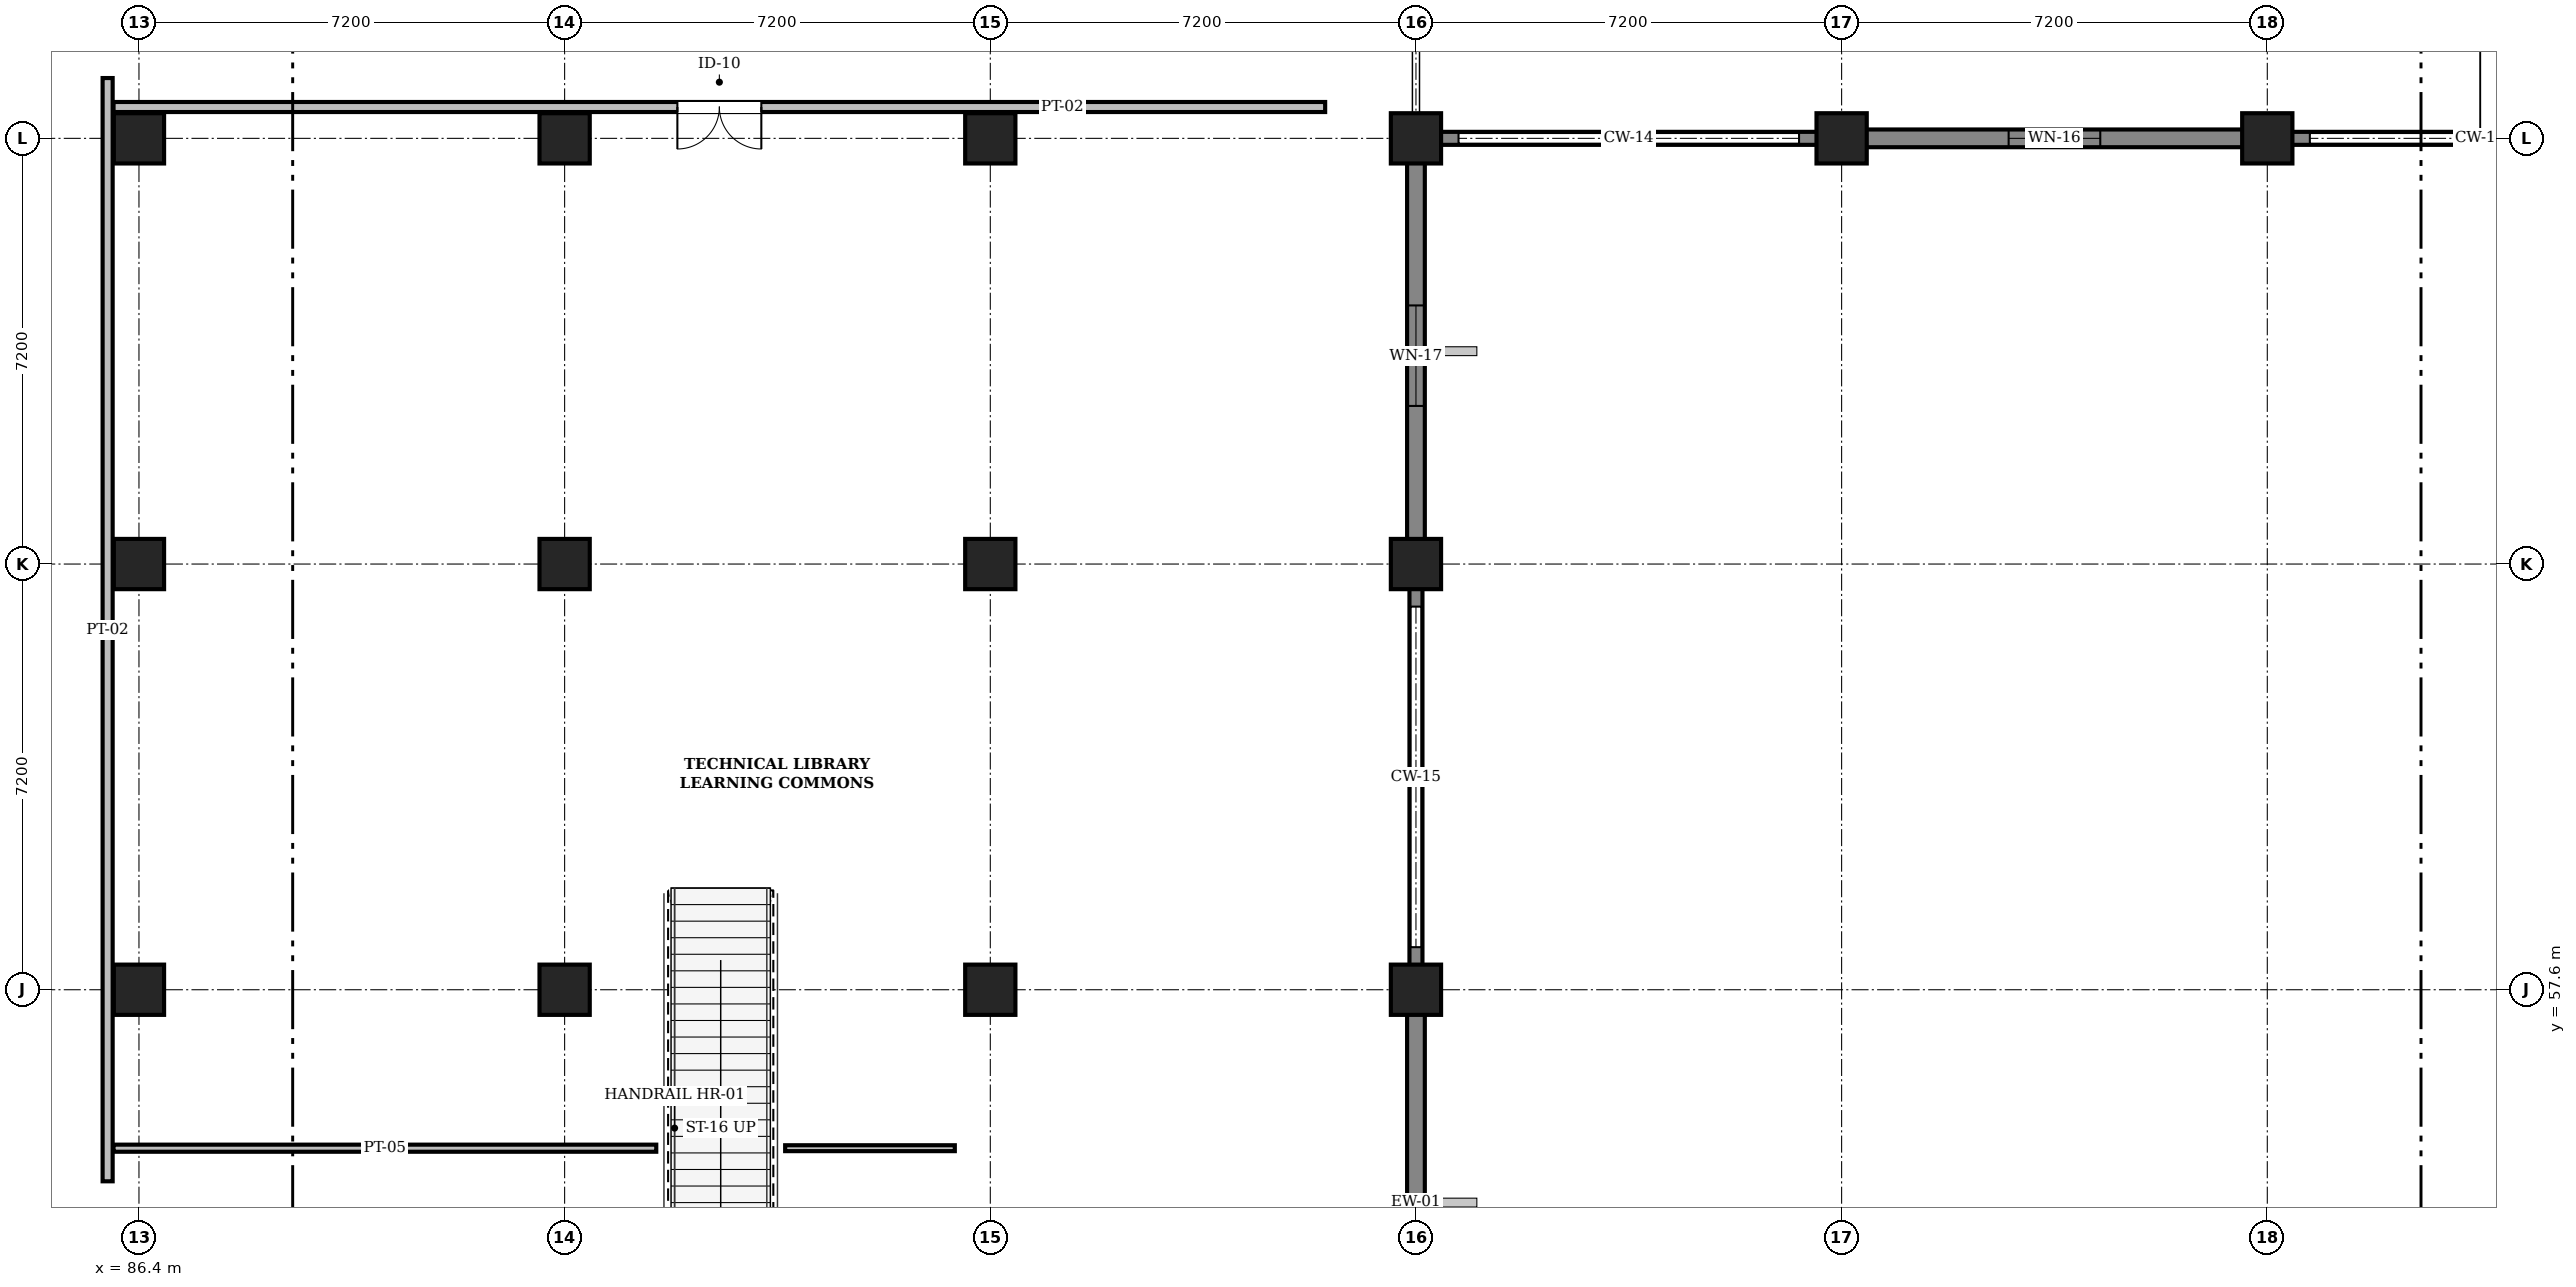
"""IFC4 building model, lengths in metres.
Left out: names, types, materials, properties, quantities, classifications, styles, units other than length and angle.
Written with IfcOpenShell. Run it as: python <this file> out.ifc"""

import sys

from ifc_helpers import new_model, si_unit, direction, frame, frame_2d, origin, origin_2d, place, context, subcontext, project, spatial, rectangle, extrude, element, fill, save


model = new_model("IFC4")
c1 = context("Model", 3, precision=1e-05, world=origin(), true_north=direction((0.0, 1.0)))
c2 = subcontext(c1, "Body", "Model", "MODEL_VIEW")
j1 = project(units=[si_unit("LENGTHUNIT", "METRE"), si_unit("PLANEANGLEUNIT", "RADIAN")], contexts=[c1])
p1 = place(None, origin())
s1 = spatial("IfcSite", under=j1, at=p1, CompositionType="ELEMENT")
p2 = place(p1, origin())
s2 = spatial("IfcBuilding", under=s1, at=p2, CompositionType="ELEMENT")
p3 = place(p2, frame((0.0, 0.0, 4.8)))
s3 = spatial("IfcBuildingStorey", under=s2, at=p3, CompositionType="ELEMENT", Elevation=4.8)
for number, where, z_axis, x_axis in (
    (1, (86.4, 57.6, 0.0), (0.0, 0.0, 1.0), (1.0, 0.0, 0.0)),
    (2, (86.4, 64.8, 0.0), (0.0, 0.0, 1.0), (1.0, 0.0, 0.0)),
    (3, (86.4, 72.0, 0.0), (0.0, 0.0, 1.0), (1.0, 0.0, 0.0)),
    (4, (93.6, 57.6, 0.0), (0.0, 0.0, 1.0), (1.0, 0.0, 0.0)),
    (5, (93.6, 64.8, 0.0), (0.0, 0.0, 1.0), (1.0, 0.0, 0.0)),
    (6, (93.6, 72.0, 0.0), (0.0, 0.0, 1.0), (1.0, 0.0, 0.0)),
    (7, (100.8, 57.6, 0.0), (0.0, 0.0, 1.0), (1.0, 0.0, 0.0)),
    (8, (100.8, 64.8, 0.0), (0.0, 0.0, 1.0), (1.0, 0.0, 0.0)),
    (9, (100.8, 72.0, 0.0), (0.0, 0.0, 1.0), (1.0, 0.0, 0.0)),
    (10, (108.0, 57.6, 0.0), (0.0, 0.0, 1.0), (1.0, 0.0, 0.0)),
    (11, (108.0, 64.8, 0.0), (0.0, 0.0, 1.0), (1.0, 0.0, 0.0)),
    (12, (108.0, 72.0, 0.0), (0.0, 0.0, 1.0), (1.0, 0.0, 0.0)),
    (13, (115.2, 72.0, 0.0), (0.0, 0.0, 1.0), (1.0, 0.0, 0.0)),
    (14, (122.4, 72.0, 0.0), (0.0, 0.0, 1.0), (1.0, 0.0, 0.0)),
):
    element("IfcColumn", number, at=place(p3, frame(where, z_axis=z_axis, x_axis=x_axis)), inside=s3, PredefinedType="COLUMN", context=c2, shape_type="SweptSolid", body=[
        extrude(rectangle(XDim=0.85, YDim=0.85, at=origin_2d()), origin(), (0.0, 0.0, 1.0), 4.8),
    ])
p4 = place(p3, frame((129.6, 72.0, 0.0), z_axis=(0.0, 0.0, 1.0), x_axis=(-1.0, 0.0, 0.0)))
e15 = element("IfcWall", 15, at=p4, inside=s3, PredefinedType="SOLIDWALL", context=c2, shape_type="SweptSolid", body=[
    extrude(rectangle(XDim=7.2, YDim=0.22, at=frame_2d((3.6, 0.0))), origin(), (0.0, 0.0, 1.0), 1.24),
])
p5 = place(p3, frame((122.4, 72.0, 0.0), z_axis=(0.0, 0.0, 1.0), x_axis=(-1.0, 0.0, 0.0)))
e16 = element("IfcWall", 16, at=p5, inside=s3, PredefinedType="SOLIDWALL", context=c2, shape_type="SweptSolid", body=[
    extrude(rectangle(XDim=7.2, YDim=0.3, at=frame_2d((3.6, 0.0))), origin(), (0.0, 0.0, 1.0), 4.52),
])
p6 = place(p5, frame((2.825, 0.0, 0.95)))
e17 = element("IfcOpeningElement", 17, at=p6, cuts=e16, PredefinedType="OPENING", context=c2, shape_type="SweptSolid", body=[
    extrude(rectangle(XDim=1.55, YDim=1.55, at=frame_2d((0.775, 0.775))), frame((0.0, 0.162, 0.0), z_axis=(0.0, -1.0, 0.0), x_axis=(1.0, 0.0, 0.0)), (0.0, 0.0, 1.0), 0.324),
])
p7 = place(p3, frame((115.2, 72.0, 0.0), z_axis=(0.0, 0.0, 1.0), x_axis=(-1.0, 0.0, 0.0)))
e18 = element("IfcWall", 18, at=p7, inside=s3, PredefinedType="SOLIDWALL", context=c2, shape_type="SweptSolid", body=[
    extrude(rectangle(XDim=7.35, YDim=0.22, at=frame_2d((3.675, 0.0))), origin(), (0.0, 0.0, 1.0), 1.24),
])
p8 = place(p3, frame((108.0, 71.848, 0.0), z_axis=(0.0, 0.0, 1.0), x_axis=(0.0, -1.0, 0.0)))
e19 = element("IfcWall", 19, at=p8, inside=s3, PredefinedType="SOLIDWALL", context=c2, shape_type="SweptSolid", body=[
    extrude(rectangle(XDim=7.048, YDim=0.3, at=frame_2d((3.524, 0.0))), origin(), (0.0, 0.0, 1.0), 4.52),
])
p9 = place(p8, frame((2.674, 0.0, 0.95)))
e20 = element("IfcOpeningElement", 20, at=p9, cuts=e19, PredefinedType="OPENING", context=c2, shape_type="SweptSolid", body=[
    extrude(rectangle(XDim=1.7, YDim=1.55, at=frame_2d((0.85, 0.775))), frame((0.0, 0.162, 0.0), z_axis=(0.0, -1.0, 0.0), x_axis=(1.0, 0.0, 0.0)), (0.0, 0.0, 1.0), 0.324),
])
p10 = place(p3, frame((108.0, 64.8, 0.0), z_axis=(0.0, 0.0, 1.0), x_axis=(0.0, -1.0, 0.0)))
e21 = element("IfcWall", 21, at=p10, inside=s3, PredefinedType="SOLIDWALL", context=c2, shape_type="SweptSolid", body=[
    extrude(rectangle(XDim=7.2, YDim=0.22, at=frame_2d((3.6, 0.0))), origin(), (0.0, 0.0, 1.0), 1.24),
])
p11 = place(p3, frame((108.0, 57.6, 0.0), z_axis=(0.0, 0.0, 1.0), x_axis=(0.0, -1.0, 0.0)))
e22 = element("IfcWall", 22, at=p11, inside=s3, PredefinedType="SOLIDWALL", context=c2, shape_type="SweptSolid", body=[
    extrude(rectangle(XDim=7.2, YDim=0.3, at=frame_2d((3.6, 0.0))), origin(), (0.0, 0.0, 1.0), 4.52),
])
p12 = place(p11, frame((4.005, 0.0, 0.95)))
e23 = element("IfcOpeningElement", 23, at=p12, cuts=e22, PredefinedType="OPENING", context=c2, shape_type="SweptSolid", body=[
    extrude(rectangle(XDim=1.85, YDim=1.55, at=frame_2d((0.925, 0.775))), frame((0.0, 0.162, 0.0), z_axis=(0.0, -1.0, 0.0), x_axis=(1.0, 0.0, 0.0)), (0.0, 0.0, 1.0), 0.324),
])
p13 = place(p3, frame((85.87, 54.36, 0.0), z_axis=(0.0, 0.0, 1.0), x_axis=(0.0, 1.0, 0.0)))
e24 = element("IfcWall", 24, at=p13, inside=s3, PredefinedType="PARTITIONING", context=c2, shape_type="SweptSolid", body=[
    extrude(rectangle(XDim=18.66, YDim=0.17, at=frame_2d((9.33, 0.0))), origin(), (0.0, 0.0, 1.0), 4.46),
])
p14 = place(p3, frame((85.97, 72.53, 0.0), z_axis=(0.0, 0.0, 1.0), x_axis=(1.0, 0.0, 0.0)))
e25 = element("IfcWall", 25, at=p14, inside=s3, PredefinedType="PARTITIONING", context=c2, shape_type="SweptSolid", body=[
    extrude(rectangle(XDim=20.494, YDim=0.17, at=frame_2d((10.247, 0.0))), origin(), (0.0, 0.0, 1.0), 4.46),
])
p15 = place(p14, frame((9.537, 0.0, 0.0)))
e26 = element("IfcOpeningElement", 26, at=p15, cuts=e25, PredefinedType="OPENING", context=c2, shape_type="SweptSolid", body=[
    extrude(rectangle(XDim=1.42, YDim=2.24, at=frame_2d((0.71, 1.12))), frame((0.0, 0.097, 0.0), z_axis=(0.0, -1.0, 0.0), x_axis=(1.0, 0.0, 0.0)), (0.0, 0.0, 1.0), 0.194),
])
p16 = place(p3, frame((85.97, 54.92, 0.0), z_axis=(0.0, 0.0, 1.0), x_axis=(1.0, 0.0, 0.0)))
e27 = element("IfcWall", 27, at=p16, inside=s3, PredefinedType="PARTITIONING", context=c2, shape_type="SweptSolid", body=[
    extrude(rectangle(XDim=9.18, YDim=0.12, at=frame_2d((4.59, 0.0))), origin(), (0.0, 0.0, 1.0), 4.46),
])
p17 = place(p3, frame((97.33, 54.92, 0.0), z_axis=(0.0, 0.0, 1.0), x_axis=(1.0, 0.0, 0.0)))
e28 = element("IfcWall", 28, at=p17, inside=s3, PredefinedType="PARTITIONING", context=c2, shape_type="SweptSolid", body=[
    extrude(rectangle(XDim=2.87, YDim=0.1, at=frame_2d((1.435, 0.0))), origin(), (0.0, 0.0, 1.0), 4.46),
])
p18 = place(p6, origin())
e29 = element("IfcWindow", 29, at=p18, inside=s3, PartitioningType="SINGLE_PANEL", PredefinedType="WINDOW", context=c2, shape_type="SweptSolid", body=[
    extrude(rectangle(XDim=1.55, YDim=1.55, at=frame_2d((0.775, 0.775))), frame((0.0, 0.03, 0.0), z_axis=(0.0, -1.0, 0.0), x_axis=(1.0, 0.0, 0.0)), (0.0, 0.0, 1.0), 0.06),
])
fill(e17, e29)
p19 = place(p9, origin())
e30 = element("IfcWindow", 30, at=p19, inside=s3, PartitioningType="SINGLE_PANEL", PredefinedType="WINDOW", context=c2, shape_type="SweptSolid", body=[
    extrude(rectangle(XDim=1.7, YDim=1.55, at=frame_2d((0.85, 0.775))), frame((0.0, 0.03, 0.0), z_axis=(0.0, -1.0, 0.0), x_axis=(1.0, 0.0, 0.0)), (0.0, 0.0, 1.0), 0.06),
])
fill(e20, e30)
p20 = place(p15, frame((1.42, 0.0, 0.0), z_axis=(0.0, 0.0, 1.0), x_axis=(-1.0, 0.0, 0.0)))
e31 = element("IfcDoor", 31, at=p20, inside=s3, OperationType="DOUBLE_DOOR_SINGLE_SWING", PredefinedType="DOOR", context=c2, shape_type="SweptSolid", body=[
    extrude(rectangle(XDim=1.42, YDim=2.24, at=frame_2d((0.71, 1.12))), frame((0.0, 0.025, 0.0), z_axis=(0.0, -1.0, 0.0), x_axis=(1.0, 0.0, 0.0)), (0.0, 0.0, 1.0), 0.05),
])
fill(e26, e31)
save(model, sys.argv[1])
